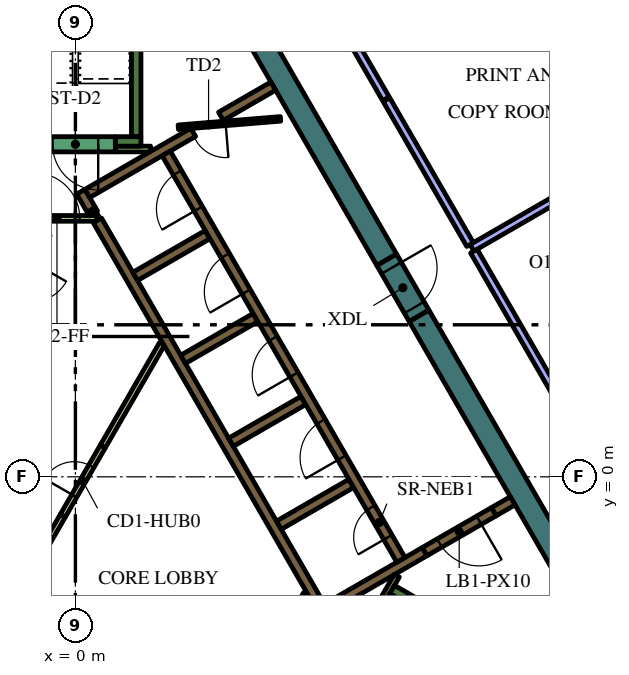
"""IFC4 building model, lengths in metres.
Left out: names, types, materials, properties, quantities, classifications, styles, units other than length and angle.
Written with IfcOpenShell. Run it as: python <this file> out.ifc"""

import sys

from ifc_helpers import new_model, si_unit, direction, frame, frame_2d, origin, place, context, subcontext, project, spatial, rectangle, extrude, element, fill, save


model = new_model("IFC4")
c1 = context("Model", 3, precision=1e-05, world=origin(), true_north=direction((0.0, 1.0)))
c2 = subcontext(c1, "Body", "Model", "MODEL_VIEW")
j1 = project(units=[si_unit("LENGTHUNIT", "METRE"), si_unit("PLANEANGLEUNIT", "RADIAN")], contexts=[c1])
p1 = place(None, origin())
s1 = spatial("IfcSite", under=j1, at=p1, CompositionType="ELEMENT")
p2 = place(p1, origin())
s2 = spatial("IfcBuilding", under=s1, at=p2, CompositionType="ELEMENT")
p3 = place(p2, frame((0.0, 0.0, 313.2)))
s3 = spatial("IfcBuildingStorey", under=s2, at=p3, CompositionType="ELEMENT", Elevation=313.2)
for number, where, z_axis, x_axis in (
    (1, (9.042, 4.239, 0.0), (0.0, 0.0, 1.0), (0.5, -0.866, 0.0)),
    (2, (1.989, 16.456, 0.0), (0.0, 0.0, 1.0), (0.5, -0.866, 0.0)),
):
    element("IfcWall", number, at=place(p3, frame(where, z_axis=z_axis, x_axis=x_axis)), inside=s3, PredefinedType="SOLIDWALL", context=c2, shape_type="SweptSolid", body=[
        extrude(rectangle(XDim=12.406, YDim=0.6, at=frame_2d((6.203, 0.0))), origin(), (0.0, 0.0, 1.0), 4.2),
    ])
p4 = place(p3, frame((8.334, -2.964, 0.0), z_axis=(0.0, 0.0, 1.0), x_axis=(0.866016039709, -0.500016218704, 0.0)))
e3 = element("IfcWall", 3, at=p4, inside=s3, PredefinedType="SOLIDWALL", context=c2, shape_type="SweptSolid", body=[
    extrude(rectangle(XDim=7.05, YDim=0.25, at=frame_2d((3.525, 0.0))), origin(), (0.0, 0.0, 1.0), 4.2),
])
p5 = place(p3, frame((8.168, -3.503, 0.0), z_axis=(0.0, 0.0, 1.0), x_axis=(0.49972245349, 0.866185586049, 0.0)))
e4 = element("IfcWall", 4, at=p5, inside=s3, PredefinedType="SOLIDWALL", context=c2, shape_type="SweptSolid", body=[
    extrude(rectangle(XDim=0.425, YDim=0.25, at=frame_2d((0.212, 0.0))), origin(), (0.0, 0.0, 1.0), 4.2),
])
p6 = place(p3, frame((1.6, 8.95, 0.0), z_axis=(0.0, 0.0, 1.0), x_axis=(0.0, 1.0, 0.0)))
e5 = element("IfcWall", 5, at=p6, inside=s3, PredefinedType="SOLIDWALL", context=c2, shape_type="SweptSolid", body=[
    extrude(rectangle(XDim=6.8, YDim=0.25, at=frame_2d((3.4, 0.0))), origin(), (0.0, 0.0, 1.0), 4.2),
])
p7 = place(p3, frame((1.05, 8.825, 0.0), z_axis=(0.0, 0.0, 1.0), x_axis=(1.0, 0.0, 0.0)))
e6 = element("IfcWall", 6, at=p7, inside=s3, PredefinedType="SOLIDWALL", context=c2, shape_type="SweptSolid", body=[
    extrude(rectangle(XDim=0.675, YDim=0.25, at=frame_2d((0.337, 0.0))), origin(), (0.0, 0.0, 1.0), 4.2),
])
p8 = place(p3, frame((11.507, -0.631, 0.0), z_axis=(0.0, 0.0, 1.0), x_axis=(-0.866093731455, -0.499881634324, 0.0)))
e7 = element("IfcWall", 7, at=p8, inside=s3, PredefinedType="SOLIDWALL", context=c2, shape_type="SweptSolid", body=[
    extrude(rectangle(XDim=0.575, YDim=0.25, at=frame_2d((0.288, 0.0))), origin(), (0.0, 0.0, 1.0), 4.2),
])
p9 = place(p3, frame((0.473, 6.93, 0.0), z_axis=(0.0, 0.0, 1.0), x_axis=(-0.49972245349, 0.866185586049, 0.0)))
e8 = element("IfcWall", 8, at=p9, inside=s3, PredefinedType="SOLIDWALL", context=c2, shape_type="SweptSolid", body=[
    extrude(rectangle(XDim=0.11, YDim=0.25, at=frame_2d((0.055, 0.0))), origin(), (0.0, 0.0, 1.0), 4.2),
])
p10 = place(p3, frame((6.568, -3.627, 0.0), z_axis=(0.0, 0.0, 1.0), x_axis=(-0.499999455981, 0.866025717874, 0.0)))
e9 = element("IfcWall", 9, at=p10, inside=s3, PredefinedType="SOLIDWALL", context=c2, shape_type="SweptSolid", body=[
    extrude(rectangle(XDim=11.978, YDim=0.25, at=frame_2d((5.989, 0.0))), origin(), (0.0, 0.0, 1.0), 4.2),
])
p11 = place(p3, frame((0.417, 7.027, 0.0), z_axis=(0.0, 0.0, 1.0), x_axis=(-0.500210807569, 0.865903659763, 0.0)))
e10 = element("IfcWall", 10, at=p11, inside=s3, PredefinedType="SOLIDWALL", context=c2, shape_type="SweptSolid", body=[
    extrude(rectangle(XDim=0.548, YDim=0.25, at=frame_2d((0.274, 0.0))), origin(), (0.0, 0.0, 1.0), 4.2),
])
p12 = place(p3, frame((3.1, 9.064, 0.0), z_axis=(0.0, 0.0, 1.0), x_axis=(-0.866030133475, -0.499991807846, 0.0)))
e11 = element("IfcWall", 11, at=p12, inside=s3, PredefinedType="SOLIDWALL", context=c2, shape_type="SweptSolid", body=[
    extrude(rectangle(XDim=3.217, YDim=0.25, at=frame_2d((1.608, 0.0))), origin(), (0.0, 0.0, 1.0), 4.2),
])
p13 = place(p3, frame((1.574, 5.274, 0.0), z_axis=(0.0, 0.0, 1.0), x_axis=(0.866028486751, 0.499994660107, 0.0)))
e12 = element("IfcWall", 12, at=p13, inside=s3, PredefinedType="SOLIDWALL", context=c2, shape_type="SweptSolid", body=[
    extrude(rectangle(XDim=2.2, YDim=0.25, at=frame_2d((1.1, 0.0))), origin(), (0.0, 0.0, 1.0), 4.2),
])
for number, where, z_axis, x_axis in (
    (13, (2.834, 3.091, 0.0), (0.0, 0.0, 1.0), (0.866, 0.5, 0.0)),
    (14, (4.094, 0.909, 0.0), (0.0, 0.0, 1.0), (0.866, 0.5, 0.0)),
    (15, (5.354, -1.274, 0.0), (0.0, 0.0, 1.0), (0.866, 0.5, 0.0)),
):
    element("IfcWall", number, at=place(p3, frame(where, z_axis=z_axis, x_axis=x_axis)), inside=s3, PredefinedType="SOLIDWALL", context=c2, shape_type="SweptSolid", body=[
        extrude(rectangle(XDim=2.2, YDim=0.25, at=frame_2d((1.1, 0.0))), origin(), (0.0, 0.0, 1.0), 4.2),
    ])
p14 = place(p3, frame((6.614, -3.456, 0.0), z_axis=(0.0, 0.0, 1.0), x_axis=(0.866032512851, 0.499987686533, 0.0)))
e16 = element("IfcWall", 16, at=p14, inside=s3, PredefinedType="SOLIDWALL", context=c2, shape_type="SweptSolid", body=[
    extrude(rectangle(XDim=2.975, YDim=0.25, at=frame_2d((1.487, 0.0))), origin(), (0.0, 0.0, 1.0), 4.2),
])
p15 = place(p3, frame((3.83, 9.486, 0.0), z_axis=(0.0, 0.0, 1.0), x_axis=(0.865986202621, 0.500067892261, 0.0)))
e17 = element("IfcWall", 17, at=p15, inside=s3, PredefinedType="SOLIDWALL", context=c2, shape_type="SweptSolid", body=[
    extrude(rectangle(XDim=1.591, YDim=0.25, at=frame_2d((0.795, 0.0))), origin(), (0.0, 0.0, 1.0), 4.2),
])
p16 = place(p3, frame((1.05, 8.625, 0.0), z_axis=(0.0, 0.0, 1.0), x_axis=(1.0, 0.0, 0.0)))
e18 = element("IfcWall", 18, at=p16, inside=s3, PredefinedType="PARTITIONING", context=c2, shape_type="SweptSolid", body=[
    extrude(rectangle(XDim=0.929, YDim=0.15, at=frame_2d((0.464, 0.0))), origin(), (0.0, 0.0, 1.0), 3.55),
])
p17 = place(p3, frame((8.459, -2.599, 0.0), z_axis=(0.0, 0.0, 1.0), x_axis=(-0.500041054325, -0.866001699761, 0.0)))
e19 = element("IfcWall", 19, at=p17, inside=s3, PredefinedType="PARTITIONING", context=c2, shape_type="SweptSolid", body=[
    extrude(rectangle(XDim=0.929, YDim=0.15, at=frame_2d((0.464, 0.0))), origin(), (0.0, 0.0, 1.0), 4.2),
])
p18 = place(p3, frame((5.705, -3.718, 0.0), z_axis=(0.0, 0.0, 1.0), x_axis=(0.499962090823, 0.866047289552, 0.0)))
e20 = element("IfcWall", 20, at=p18, inside=s3, PredefinedType="PARTITIONING", context=c2, shape_type="SweptSolid", body=[
    extrude(rectangle(XDim=0.735, YDim=0.15, at=frame_2d((0.367, 0.0))), origin(), (0.0, 0.0, 1.0), 3.55),
])
p19 = place(p3, frame((-1.887, -3.718, 0.0), z_axis=(0.0, 0.0, 1.0), x_axis=(0.500043732237, 0.866000153493, 0.0)))
e21 = element("IfcWall", 21, at=p19, inside=s3, PredefinedType="PARTITIONING", context=c2, shape_type="SweptSolid", body=[
    extrude(rectangle(XDim=3.114, YDim=0.15, at=frame_2d((1.557, 0.0))), origin(), (0.0, 0.0, 1.0), 3.55),
])
p20 = place(p3, frame((0.72, 0.797, 0.0), z_axis=(0.0, 0.0, 1.0), x_axis=(0.499984921984, 0.866034108906, 0.0)))
e22 = element("IfcWall", 22, at=p20, inside=s3, PredefinedType="PARTITIONING", context=c2, shape_type="SweptSolid", body=[
    extrude(rectangle(XDim=3.113, YDim=0.15, at=frame_2d((1.557, 0.0))), origin(), (0.0, 0.0, 1.0), 3.55),
])
p21 = place(p3, frame((8.565, -2.185, 0.0), z_axis=(0.0, 0.0, 1.0), x_axis=(-0.499997954832, 0.866026584559, 0.0)))
e23 = element("IfcWall", 23, at=p21, inside=s3, PredefinedType="SOLIDWALL", context=c2, shape_type="SweptSolid", body=[
    extrude(rectangle(XDim=12.35, YDim=0.25, at=frame_2d((6.175, 0.0))), origin(), (0.0, 0.0, 1.0), 4.2),
])
p22 = place(p21, frame((0.685, 0.0, 0.0)))
e24 = element("IfcOpeningElement", 24, at=p22, cuts=e23, PredefinedType="OPENING", context=c2, shape_type="SweptSolid", body=[
    extrude(rectangle(XDim=0.9, YDim=2.1, at=frame_2d((0.45, 1.05))), frame((0.0, 0.135, 0.0), z_axis=(0.0, -1.0, 0.0), x_axis=(1.0, 0.0, 0.0)), (0.0, 0.0, 1.0), 0.27),
])
p23 = place(p21, frame((3.105, 0.0, 0.0)))
e25 = element("IfcOpeningElement", 25, at=p23, cuts=e23, PredefinedType="OPENING", context=c2, shape_type="SweptSolid", body=[
    extrude(rectangle(XDim=1.1, YDim=2.1, at=frame_2d((0.55, 1.05))), frame((0.0, 0.135, 0.0), z_axis=(0.0, -1.0, 0.0), x_axis=(1.0, 0.0, 0.0)), (0.0, 0.0, 1.0), 0.27),
])
p24 = place(p21, frame((5.625, 0.0, 0.0)))
e26 = element("IfcOpeningElement", 26, at=p24, cuts=e23, PredefinedType="OPENING", context=c2, shape_type="SweptSolid", body=[
    extrude(rectangle(XDim=1.1, YDim=2.1, at=frame_2d((0.55, 1.05))), frame((0.0, 0.135, 0.0), z_axis=(0.0, -1.0, 0.0), x_axis=(1.0, 0.0, 0.0)), (0.0, 0.0, 1.0), 0.27),
])
p25 = place(p21, frame((8.145, 0.0, 0.0)))
e27 = element("IfcOpeningElement", 27, at=p25, cuts=e23, PredefinedType="OPENING", context=c2, shape_type="SweptSolid", body=[
    extrude(rectangle(XDim=1.1, YDim=2.1, at=frame_2d((0.55, 1.05))), frame((0.0, 0.135, 0.0), z_axis=(0.0, -1.0, 0.0), x_axis=(1.0, 0.0, 0.0)), (0.0, 0.0, 1.0), 0.27),
])
p26 = place(p21, frame((10.665, 0.0, 0.0)))
e28 = element("IfcOpeningElement", 28, at=p26, cuts=e23, PredefinedType="OPENING", context=c2, shape_type="SweptSolid", body=[
    extrude(rectangle(XDim=1.1, YDim=2.1, at=frame_2d((0.55, 1.05))), frame((0.0, 0.135, 0.0), z_axis=(0.0, -1.0, 0.0), x_axis=(1.0, 0.0, 0.0)), (0.0, 0.0, 1.0), 0.27),
])
p27 = place(p3, frame((1.05, 8.75, 0.0), z_axis=(0.0, 0.0, 1.0), x_axis=(-1.0, 0.0, 0.0)))
e29 = element("IfcWall", 29, at=p27, inside=s3, PredefinedType="SOLIDWALL", context=c2, shape_type="SweptSolid", body=[
    extrude(rectangle(XDim=2.1, YDim=0.4, at=frame_2d((1.05, 0.0))), origin(), (0.0, 0.0, 1.0), 4.2),
])
p28 = place(p27, frame((0.45, 0.0, 0.0)))
e30 = element("IfcOpeningElement", 30, at=p28, cuts=e29, PredefinedType="OPENING", context=c2, shape_type="SweptSolid", body=[
    extrude(rectangle(XDim=1.2, YDim=2.1, at=frame_2d((0.6, 1.05))), frame((0.0, 0.21, 0.0), z_axis=(0.0, -1.0, 0.0), x_axis=(1.0, 0.0, 0.0)), (0.0, 0.0, 1.0), 0.42),
])
p29 = place(p3, frame((5.398, 9.419, 0.0), z_axis=(0.0, 0.0, 1.0), x_axis=(-0.996653416376, -0.081743303248, 0.0)))
e31 = element("IfcWall", 31, at=p29, inside=s3, PredefinedType="PARTITIONING", context=c2, shape_type="SweptSolid", body=[
    extrude(rectangle(XDim=2.7, YDim=0.12, at=frame_2d((1.35, 0.0))), origin(), (0.0, 0.0, 1.0), 3.55),
])
p30 = place(p29, frame((1.45, 0.0, 0.0)))
e32 = element("IfcOpeningElement", 32, at=p30, cuts=e31, PredefinedType="OPENING", context=c2, shape_type="SweptSolid", body=[
    extrude(rectangle(XDim=0.9, YDim=2.1, at=frame_2d((0.45, 1.05))), frame((0.0, 0.07, 0.0), z_axis=(0.0, -1.0, 0.0), x_axis=(1.0, 0.0, 0.0)), (0.0, 0.0, 1.0), 0.14),
])
p31 = place(p3, frame((-0.33, -1.022, 0.0), z_axis=(0.0, 0.0, 1.0), x_axis=(0.500027713859, 0.866009402589, 0.0)))
e33 = element("IfcWall", 33, at=p31, inside=s3, PredefinedType="PARTITIONING", context=c2, shape_type="SweptSolid", body=[
    extrude(rectangle(XDim=2.1, YDim=0.15, at=frame_2d((1.05, 0.0))), origin(), (0.0, 0.0, 1.0), 3.55),
])
p32 = place(p31, frame((0.6, 0.0, 0.0)))
e34 = element("IfcOpeningElement", 34, at=p32, cuts=e33, PredefinedType="OPENING", context=c2, shape_type="SweptSolid", body=[
    extrude(rectangle(XDim=0.9, YDim=2.1, at=frame_2d((0.45, 1.05))), frame((0.0, 0.085, 0.0), z_axis=(0.0, -1.0, 0.0), x_axis=(1.0, 0.0, 0.0)), (0.0, 0.0, 1.0), 0.17),
])
p33 = place(p3, frame((-1.534, 6.8, 0.0), z_axis=(0.0, 0.0, 1.0), x_axis=(1.0, 0.0, 0.0)))
e35 = element("IfcWall", 35, at=p33, inside=s3, PredefinedType="PARTITIONING", context=c2, shape_type="SweptSolid", body=[
    extrude(rectangle(XDim=2.1, YDim=0.15, at=frame_2d((1.05, 0.0))), origin(), (0.0, 0.0, 1.0), 3.55),
])
p34 = place(p33, frame((0.45, 0.0, 0.0)))
e36 = element("IfcOpeningElement", 36, at=p34, cuts=e35, PredefinedType="OPENING", context=c2, shape_type="SweptSolid", body=[
    extrude(rectangle(XDim=1.2, YDim=2.1, at=frame_2d((0.6, 1.05))), frame((0.0, 0.085, 0.0), z_axis=(0.0, -1.0, 0.0), x_axis=(1.0, 0.0, 0.0)), (0.0, 0.0, 1.0), 0.17),
])
p35 = place(p3, frame((11.009, -0.919, 0.0), z_axis=(0.0, 0.0, 1.0), x_axis=(-0.866059744384, -0.49994051562, 0.0)))
e37 = element("IfcWall", 37, at=p35, inside=s3, PredefinedType="SOLIDWALL", context=c2, shape_type="SweptSolid", body=[
    extrude(rectangle(XDim=2.1, YDim=0.25, at=frame_2d((1.05, 0.0))), origin(), (0.0, 0.0, 1.0), 4.2),
])
p36 = place(p35, frame((0.45, 0.0, 0.0)))
e38 = element("IfcOpeningElement", 38, at=p36, cuts=e37, PredefinedType="OPENING", context=c2, shape_type="SweptSolid", body=[
    extrude(rectangle(XDim=1.2, YDim=2.1, at=frame_2d((0.6, 1.05))), frame((0.0, 0.135, 0.0), z_axis=(0.0, -1.0, 0.0), x_axis=(1.0, 0.0, 0.0)), (0.0, 0.0, 1.0), 0.27),
])
p37 = place(p3, frame((8.192, 5.711, 0.0), z_axis=(0.0, 0.0, 1.0), x_axis=(0.500062241894, -0.865989465428, 0.0)))
e39 = element("IfcWall", 39, at=p37, inside=s3, PredefinedType="SOLIDWALL", context=c2, shape_type="SweptSolid", body=[
    extrude(rectangle(XDim=1.7, YDim=0.6, at=frame_2d((0.85, 0.0))), origin(), (0.0, 0.0, 1.0), 4.2),
])
p38 = place(p37, frame((0.25, 0.0, 0.0)))
e40 = element("IfcOpeningElement", 40, at=p38, cuts=e39, PredefinedType="OPENING", context=c2, shape_type="SweptSolid", body=[
    extrude(rectangle(XDim=1.2, YDim=2.1, at=frame_2d((0.6, 1.05))), frame((0.0, 0.31, 0.0), z_axis=(0.0, -1.0, 0.0), x_axis=(1.0, 0.0, 0.0)), (0.0, 0.0, 1.0), 0.62),
])
p39 = place(p3, frame((10.436, 6.025, 0.0), z_axis=(0.0, 0.0, 1.0), x_axis=(0.866030664334, 0.49999088835, 0.0)))
e41 = element("IfcWall", 41, at=p39, inside=s3, PredefinedType="PARTITIONING", context=c2, shape_type="SweptSolid", body=[
    extrude(rectangle(XDim=3.49, YDim=0.2, at=frame_2d((1.745, 0.0))), origin(), (0.0, 0.0, 1.0), 3.55),
])
for number, where, z_axis, x_axis in (
    (42, (12.686, 2.128, 0.0), (0.0, 0.0, 1.0), (-0.5, 0.866, 0.0)),
    (43, (10.385, 6.112, 0.0), (0.0, 0.0, 1.0), (-0.5, 0.866, 0.0)),
):
    element("IfcWall", number, at=place(p3, frame(where, z_axis=z_axis, x_axis=x_axis)), inside=s3, PredefinedType="PARTITIONING", context=c2, shape_type="SweptSolid", body=[
        extrude(rectangle(XDim=4.4, YDim=0.2, at=frame_2d((2.2, 0.0))), origin(), (0.0, 0.0, 1.0), 3.55),
    ])
p40 = place(p3, frame((8.171, 9.948, 0.0), z_axis=(0.0, 0.0, 1.0), x_axis=(-0.500044545065, 0.865999684151, 0.0)))
e44 = element("IfcWall", 44, at=p40, inside=s3, PredefinedType="PARTITIONING", context=c2, shape_type="SweptSolid", body=[
    extrude(rectangle(XDim=1.815, YDim=0.2, at=frame_2d((0.908, 0.0))), origin(), (0.0, 0.0, 1.0), 3.55),
])
p41 = place(p22, origin())
e45 = element("IfcDoor", 45, at=p41, inside=s3, OperationType="SINGLE_SWING_LEFT", PredefinedType="DOOR", context=c2, shape_type="SweptSolid", body=[
    extrude(rectangle(XDim=0.9, YDim=2.1, at=frame_2d((0.45, 1.05))), frame((0.0, 0.025, 0.0), z_axis=(0.0, -1.0, 0.0), x_axis=(1.0, 0.0, 0.0)), (0.0, 0.0, 1.0), 0.05),
])
fill(e24, e45)
p42 = place(p23, origin())
e46 = element("IfcDoor", 46, at=p42, inside=s3, OperationType="DOUBLE_DOOR_SLIDING", PredefinedType="DOOR", context=c2, shape_type="SweptSolid", body=[
    extrude(rectangle(XDim=1.1, YDim=2.1, at=frame_2d((0.55, 1.05))), frame((0.0, 0.025, 0.0), z_axis=(0.0, -1.0, 0.0), x_axis=(1.0, 0.0, 0.0)), (0.0, 0.0, 1.0), 0.05),
])
fill(e25, e46)
p43 = place(p24, origin())
e47 = element("IfcDoor", 47, at=p43, inside=s3, OperationType="DOUBLE_DOOR_SLIDING", PredefinedType="DOOR", context=c2, shape_type="SweptSolid", body=[
    extrude(rectangle(XDim=1.1, YDim=2.1, at=frame_2d((0.55, 1.05))), frame((0.0, 0.025, 0.0), z_axis=(0.0, -1.0, 0.0), x_axis=(1.0, 0.0, 0.0)), (0.0, 0.0, 1.0), 0.05),
])
fill(e26, e47)
p44 = place(p25, origin())
e48 = element("IfcDoor", 48, at=p44, inside=s3, OperationType="DOUBLE_DOOR_SLIDING", PredefinedType="DOOR", context=c2, shape_type="SweptSolid", body=[
    extrude(rectangle(XDim=1.1, YDim=2.1, at=frame_2d((0.55, 1.05))), frame((0.0, 0.025, 0.0), z_axis=(0.0, -1.0, 0.0), x_axis=(1.0, 0.0, 0.0)), (0.0, 0.0, 1.0), 0.05),
])
fill(e27, e48)
p45 = place(p26, origin())
e49 = element("IfcDoor", 49, at=p45, inside=s3, OperationType="DOUBLE_DOOR_SLIDING", PredefinedType="DOOR", context=c2, shape_type="SweptSolid", body=[
    extrude(rectangle(XDim=1.1, YDim=2.1, at=frame_2d((0.55, 1.05))), frame((0.0, 0.025, 0.0), z_axis=(0.0, -1.0, 0.0), x_axis=(1.0, 0.0, 0.0)), (0.0, 0.0, 1.0), 0.05),
])
fill(e28, e49)
p46 = place(p28, origin())
e50 = element("IfcDoor", 50, at=p46, inside=s3, OperationType="SINGLE_SWING_LEFT", PredefinedType="DOOR", context=c2, shape_type="SweptSolid", body=[
    extrude(rectangle(XDim=1.2, YDim=2.1, at=frame_2d((0.6, 1.05))), frame((0.0, 0.025, 0.0), z_axis=(0.0, -1.0, 0.0), x_axis=(1.0, 0.0, 0.0)), (0.0, 0.0, 1.0), 0.05),
])
fill(e30, e50)
p47 = place(p30, origin())
e51 = element("IfcDoor", 51, at=p47, inside=s3, OperationType="SINGLE_SWING_LEFT", PredefinedType="DOOR", context=c2, shape_type="SweptSolid", body=[
    extrude(rectangle(XDim=0.9, YDim=2.1, at=frame_2d((0.45, 1.05))), frame((0.0, 0.025, 0.0), z_axis=(0.0, -1.0, 0.0), x_axis=(1.0, 0.0, 0.0)), (0.0, 0.0, 1.0), 0.05),
])
fill(e32, e51)
p48 = place(p32, origin())
e52 = element("IfcDoor", 52, at=p48, inside=s3, OperationType="SINGLE_SWING_LEFT", PredefinedType="DOOR", context=c2, shape_type="SweptSolid", body=[
    extrude(rectangle(XDim=0.9, YDim=2.1, at=frame_2d((0.45, 1.05))), frame((0.0, 0.025, 0.0), z_axis=(0.0, -1.0, 0.0), x_axis=(1.0, 0.0, 0.0)), (0.0, 0.0, 1.0), 0.05),
])
fill(e34, e52)
p49 = place(p34, origin())
e53 = element("IfcDoor", 53, at=p49, inside=s3, OperationType="SINGLE_SWING_LEFT", PredefinedType="DOOR", context=c2, shape_type="SweptSolid", body=[
    extrude(rectangle(XDim=1.2, YDim=2.1, at=frame_2d((0.6, 1.05))), frame((0.0, 0.025, 0.0), z_axis=(0.0, -1.0, 0.0), x_axis=(1.0, 0.0, 0.0)), (0.0, 0.0, 1.0), 0.05),
])
fill(e36, e53)
p50 = place(p36, origin())
e54 = element("IfcDoor", 54, at=p50, inside=s3, OperationType="SINGLE_SWING_LEFT", PredefinedType="DOOR", context=c2, shape_type="SweptSolid", body=[
    extrude(rectangle(XDim=1.2, YDim=2.1, at=frame_2d((0.6, 1.05))), frame((0.0, 0.025, 0.0), z_axis=(0.0, -1.0, 0.0), x_axis=(1.0, 0.0, 0.0)), (0.0, 0.0, 1.0), 0.05),
])
fill(e38, e54)
p51 = place(p38, origin())
e55 = element("IfcDoor", 55, at=p51, inside=s3, OperationType="SINGLE_SWING_LEFT", PredefinedType="DOOR", context=c2, shape_type="SweptSolid", body=[
    extrude(rectangle(XDim=1.2, YDim=2.1, at=frame_2d((0.6, 1.05))), frame((0.0, 0.025, 0.0), z_axis=(0.0, -1.0, 0.0), x_axis=(1.0, 0.0, 0.0)), (0.0, 0.0, 1.0), 0.05),
])
fill(e40, e55)
save(model, sys.argv[1])
